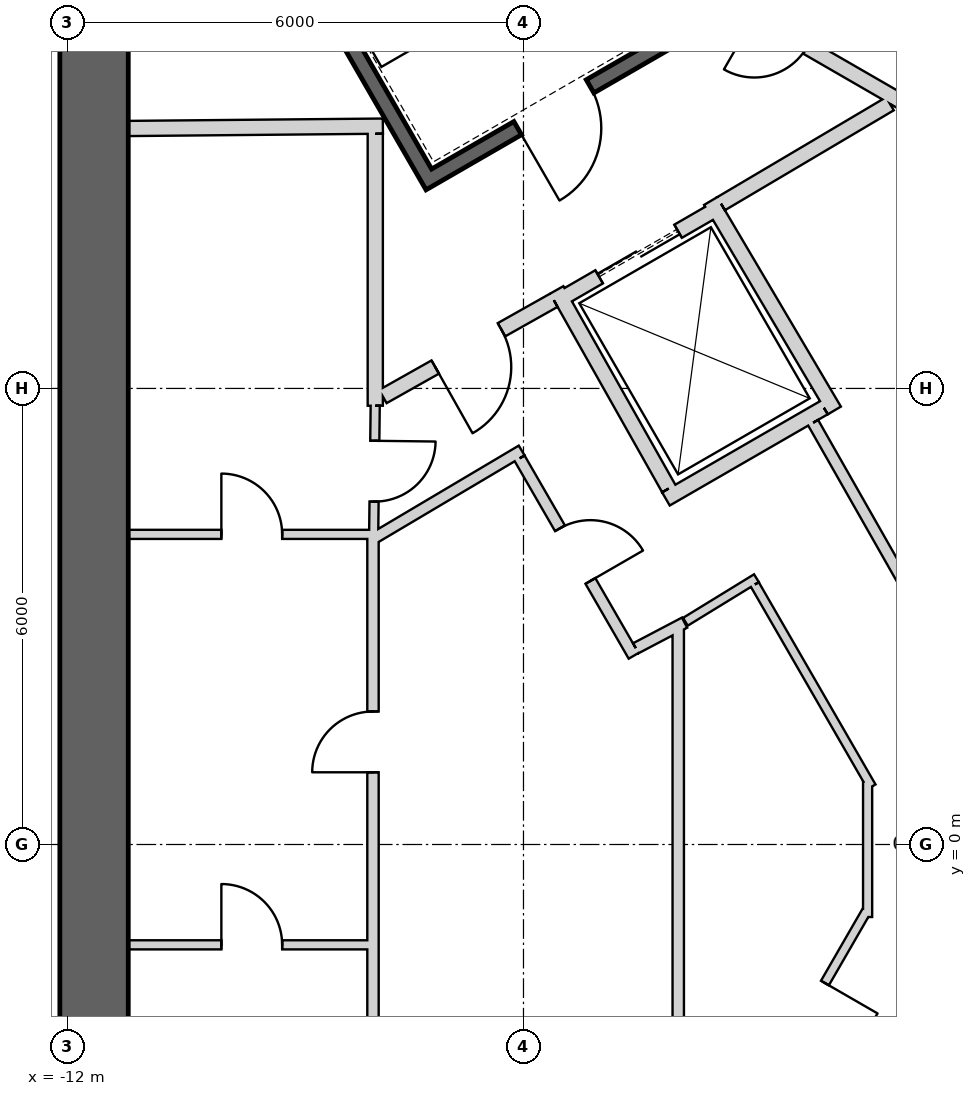
"""IFC4 building model, lengths in metres.
Left out: names, types, materials, properties, quantities, classifications, styles, units other than length and angle.
Written with IfcOpenShell. Run it as: python <this file> out.ifc"""

import sys

from ifc_helpers import new_model, si_unit, direction, frame, frame_2d, origin, place, context, subcontext, project, spatial, rectangle, extrude, element, fill, save


model = new_model("IFC4")
c1 = context("Model", 3, precision=1e-05, world=origin(), true_north=direction((0.0, 1.0)))
c2 = subcontext(c1, "Body", "Model", "MODEL_VIEW")
j1 = project(units=[si_unit("LENGTHUNIT", "METRE"), si_unit("PLANEANGLEUNIT", "RADIAN")], contexts=[c1])
p1 = place(None, origin())
s1 = spatial("IfcSite", under=j1, at=p1, CompositionType="ELEMENT")
p2 = place(p1, origin())
s2 = spatial("IfcBuilding", under=s1, at=p2, CompositionType="ELEMENT")
p3 = place(p2, frame((0.0, 0.0, 435.3)))
s3 = spatial("IfcBuildingStorey", under=s2, at=p3, CompositionType="ELEMENT", Elevation=435.3)
p4 = place(p3, frame((19.475, 2.208, 0.0), z_axis=(0.0, 0.0, 1.0), x_axis=(-0.866028369851, 0.499994862586, 0.0)))
e1 = element("IfcWall", 1, at=p4, inside=s3, PredefinedType="SHEAR", context=c2, shape_type="SweptSolid", body=[
    extrude(rectangle(XDim=31.523, YDim=0.9, at=frame_2d((15.762, 0.0))), origin(), (0.0, 0.0, 1.0), 5.0),
])
p5 = place(p4, frame((3.612, 0.0, 0.0)))
e2 = element("IfcOpeningElement", 2, at=p5, cuts=e1, PredefinedType="OPENING", context=c2, shape_type="SweptSolid", body=[
    extrude(rectangle(XDim=1.2, YDim=2.4, at=frame_2d((0.6, 1.2))), frame((0.0, 0.46, 0.0), z_axis=(0.0, -1.0, 0.0), x_axis=(1.0, 0.0, 0.0)), (0.0, 0.0, 1.0), 0.92),
])
p6 = place(p4, frame((26.712, 0.0, 0.0)))
e3 = element("IfcOpeningElement", 3, at=p6, cuts=e1, PredefinedType="OPENING", context=c2, shape_type="SweptSolid", body=[
    extrude(rectangle(XDim=1.2, YDim=2.4, at=frame_2d((0.6, 1.2))), frame((0.0, 0.46, 0.0), z_axis=(0.0, -1.0, 0.0), x_axis=(1.0, 0.0, 0.0)), (0.0, 0.0, 1.0), 0.92),
])
p7 = place(p3, frame((-11.65, 15.762, 0.0), z_axis=(0.0, 0.0, 1.0), x_axis=(0.0, -1.0, 0.0)))
e4 = element("IfcWall", 4, at=p7, inside=s3, PredefinedType="SHEAR", context=c2, shape_type="SweptSolid", body=[
    extrude(rectangle(XDim=31.523, YDim=0.9, at=frame_2d((15.762, 0.0))), origin(), (0.0, 0.0, 1.0), 5.0),
])
p8 = place(p7, frame((3.612, 0.0, 0.0)))
e5 = element("IfcOpeningElement", 5, at=p8, cuts=e4, PredefinedType="OPENING", context=c2, shape_type="SweptSolid", body=[
    extrude(rectangle(XDim=1.2, YDim=2.4, at=frame_2d((0.6, 1.2))), frame((0.0, 0.46, 0.0), z_axis=(0.0, -1.0, 0.0), x_axis=(1.0, 0.0, 0.0)), (0.0, 0.0, 1.0), 0.92),
])
p9 = place(p7, frame((26.712, 0.0, 0.0)))
e6 = element("IfcOpeningElement", 6, at=p9, cuts=e4, PredefinedType="OPENING", context=c2, shape_type="SweptSolid", body=[
    extrude(rectangle(XDim=1.2, YDim=2.4, at=frame_2d((0.6, 1.2))), frame((0.0, 0.46, 0.0), z_axis=(0.0, -1.0, 0.0), x_axis=(1.0, 0.0, 0.0)), (0.0, 0.0, 1.0), 0.92),
])
p10 = place(p3, frame((-7.825, -17.97, 0.0), z_axis=(0.0, 0.0, 1.0), x_axis=(0.866028369851, 0.499994862586, 0.0)))
e7 = element("IfcWall", 7, at=p10, inside=s3, PredefinedType="SHEAR", context=c2, shape_type="SweptSolid", body=[
    extrude(rectangle(XDim=31.523, YDim=0.9, at=frame_2d((15.762, 0.0))), origin(), (0.0, 0.0, 1.0), 5.0),
])
p11 = place(p10, frame((17.862, 0.0, 0.0)))
e8 = element("IfcOpeningElement", 8, at=p11, cuts=e7, PredefinedType="OPENING", context=c2, shape_type="SweptSolid", body=[
    extrude(rectangle(XDim=1.2, YDim=2.4, at=frame_2d((0.6, 1.2))), frame((0.0, 0.46, 0.0), z_axis=(0.0, -1.0, 0.0), x_axis=(1.0, 0.0, 0.0)), (0.0, 0.0, 1.0), 0.92),
])
p12 = place(p10, frame((20.562, 0.0, 0.0)))
e9 = element("IfcOpeningElement", 9, at=p12, cuts=e7, PredefinedType="OPENING", context=c2, shape_type="SweptSolid", body=[
    extrude(rectangle(XDim=1.2, YDim=2.4, at=frame_2d((0.6, 1.2))), frame((0.0, 0.46, 0.0), z_axis=(0.0, -1.0, 0.0), x_axis=(1.0, 0.0, 0.0)), (0.0, 0.0, 1.0), 0.92),
])
p13 = place(p10, frame((26.712, 0.0, 0.0)))
e10 = element("IfcOpeningElement", 10, at=p13, cuts=e7, PredefinedType="OPENING", context=c2, shape_type="SweptSolid", body=[
    extrude(rectangle(XDim=1.2, YDim=2.4, at=frame_2d((0.6, 1.2))), frame((0.0, 0.46, 0.0), z_axis=(0.0, -1.0, 0.0), x_axis=(1.0, 0.0, 0.0)), (0.0, 0.0, 1.0), 0.92),
])
p14 = place(p10, frame((3.612, 0.0, 0.0)))
e11 = element("IfcOpeningElement", 11, at=p14, cuts=e7, PredefinedType="OPENING", context=c2, shape_type="SweptSolid", body=[
    extrude(rectangle(XDim=1.2, YDim=2.4, at=frame_2d((0.6, 1.2))), frame((0.0, 0.46, 0.0), z_axis=(0.0, -1.0, 0.0), x_axis=(1.0, 0.0, 0.0)), (0.0, 0.0, 1.0), 0.92),
])
p15 = place(p3, frame((-11.245, 15.678, -0.25), z_axis=(0.0, 0.0, 1.0), x_axis=(0.499977274689, -0.866038523851, 0.0)))
e12 = element("IfcWall", 12, at=p15, inside=s3, PredefinedType="SHEAR", context=c2, shape_type="SweptSolid", body=[
    extrude(rectangle(XDim=8.1, YDim=0.2, at=frame_2d((4.05, 0.0))), origin(), (0.0, 0.0, 1.0), 5.0),
])
p16 = place(p3, frame((-7.159, 8.8, -0.25), z_axis=(0.0, 0.0, 1.0), x_axis=(0.866047807691, 0.499961193289, 0.0)))
e13 = element("IfcWall", 13, at=p16, inside=s3, PredefinedType="SHEAR", context=c2, shape_type="SweptSolid", body=[
    extrude(rectangle(XDim=3.6, YDim=0.2, at=frame_2d((1.8, 0.0))), origin(), (0.0, 0.0, 1.0), 5.0),
])
p17 = place(p16, frame((1.25, 0.0, 0.25)))
e14 = element("IfcOpeningElement", 14, at=p17, cuts=e13, PredefinedType="OPENING", context=c2, shape_type="SweptSolid", body=[
    extrude(rectangle(XDim=1.1, YDim=2.1, at=frame_2d((0.55, 1.05))), frame((0.0, 0.11, 0.0), z_axis=(0.0, -1.0, 0.0), x_axis=(1.0, 0.0, 0.0)), (0.0, 0.0, 1.0), 0.22),
])
p18 = place(p3, frame((-5.524, 7.168, 0.0), z_axis=(0.0, 0.0, 1.0), x_axis=(0.866024647952, 0.500001309137, 0.0)))
e15 = element("IfcWall", 15, at=p18, inside=s3, PredefinedType="PLUMBINGWALL", context=c2, shape_type="SweptSolid", body=[
    extrude(rectangle(XDim=2.4, YDim=0.2, at=frame_2d((1.2, 0.0))), origin(), (0.0, 0.0, 1.0), 4.75),
])
p19 = place(p18, frame((0.6, 0.0, 0.0)))
e16 = element("IfcOpeningElement", 16, at=p19, cuts=e15, PredefinedType="OPENING", context=c2, shape_type="SweptSolid", body=[
    extrude(rectangle(XDim=1.2, YDim=2.4, at=frame_2d((0.6, 1.2))), frame((0.0, 0.11, 0.0), z_axis=(0.0, -1.0, 0.0), x_axis=(1.0, 0.0, 0.0)), (0.0, 0.0, 1.0), 0.22),
])
p20 = place(p3, frame((-3.538, 8.465, 0.0), z_axis=(0.0, 0.0, 1.0), x_axis=(0.508616218331, -0.860993346345, 0.0)))
e17 = element("IfcWall", 17, at=p20, inside=s3, PredefinedType="PLUMBINGWALL", context=c2, shape_type="SweptSolid", body=[
    extrude(rectangle(XDim=3.2, YDim=0.2, at=frame_2d((1.6, 0.0))), origin(), (0.0, 0.0, 1.0), 4.75),
])
p21 = place(p3, frame((-2.047, 5.746, 0.0), z_axis=(0.0, 0.0, 1.0), x_axis=(-0.866024647952, -0.500001309137, 0.0)))
e18 = element("IfcWall", 18, at=p21, inside=s3, PredefinedType="PLUMBINGWALL", context=c2, shape_type="SweptSolid", body=[
    extrude(rectangle(XDim=2.4, YDim=0.2, at=frame_2d((1.2, 0.0))), origin(), (0.0, 0.0, 1.0), 4.75),
])
p22 = place(p3, frame((-5.562, 7.296, 0.0), z_axis=(0.0, 0.0, 1.0), x_axis=(0.49134651263, -0.870964180966, 0.0)))
e19 = element("IfcWall", 19, at=p22, inside=s3, PredefinedType="PLUMBINGWALL", context=c2, shape_type="SweptSolid", body=[
    extrude(rectangle(XDim=3.0, YDim=0.2, at=frame_2d((1.5, 0.0))), origin(), (0.0, 0.0, 1.0), 4.75),
])
p23 = place(p3, frame((-11.2, 4.08, 0.0), z_axis=(0.0, 0.0, 1.0), x_axis=(1.0, 0.0, 0.0)))
e20 = element("IfcWall", 20, at=p23, inside=s3, PredefinedType="PARTITIONING", context=c2, shape_type="SweptSolid", body=[
    extrude(rectangle(XDim=3.25, YDim=0.12, at=frame_2d((1.625, 0.0))), origin(), (0.0, 0.0, 1.0), 4.75),
])
p24 = place(p23, frame((1.225, 0.0, 0.0)))
e21 = element("IfcOpeningElement", 21, at=p24, cuts=e20, PredefinedType="OPENING", context=c2, shape_type="SweptSolid", body=[
    extrude(rectangle(XDim=0.8, YDim=2.1, at=frame_2d((0.4, 1.05))), frame((0.0, 0.07, 0.0), z_axis=(0.0, -1.0, 0.0), x_axis=(1.0, 0.0, 0.0)), (0.0, 0.0, 1.0), 0.14),
])
p25 = place(p3, frame((-7.85, 9.451, 0.0), z_axis=(0.0, 0.0, 1.0), x_axis=(-0.999957167047, -0.009255488683, 0.0)))
e22 = element("IfcWall", 22, at=p25, inside=s3, PredefinedType="PARTITIONING", context=c2, shape_type="SweptSolid", body=[
    extrude(rectangle(XDim=3.35, YDim=0.2, at=frame_2d((1.675, 0.0))), origin(), (0.0, 0.0, 1.0), 4.75),
])
p26 = place(p3, frame((-7.95, 5.772, 0.0), z_axis=(0.0, 0.0, 1.0), x_axis=(0.0, 1.0, 0.0)))
e23 = element("IfcWall", 23, at=p26, inside=s3, PredefinedType="PARTITIONING", context=c2, shape_type="SweptSolid", body=[
    extrude(rectangle(XDim=3.578, YDim=0.2, at=frame_2d((1.789, 0.0))), origin(), (0.0, 0.0, 1.0), 4.75),
])
p27 = place(p3, frame((-7.971, 4.05, 0.0), z_axis=(0.0, 0.0, 1.0), x_axis=(0.012047318415, 0.999927428426, 0.0)))
e24 = element("IfcWall", 24, at=p27, inside=s3, PredefinedType="PARTITIONING", context=c2, shape_type="SweptSolid", body=[
    extrude(rectangle(XDim=1.723, YDim=0.12, at=frame_2d((0.861, 0.0))), origin(), (0.0, 0.0, 1.0), 4.75),
])
p28 = place(p27, frame((0.461, 0.0, 0.0)))
e25 = element("IfcOpeningElement", 25, at=p28, cuts=e24, PredefinedType="OPENING", context=c2, shape_type="SweptSolid", body=[
    extrude(rectangle(XDim=0.8, YDim=2.1, at=frame_2d((0.4, 1.05))), frame((0.0, 0.07, 0.0), z_axis=(0.0, -1.0, 0.0), x_axis=(1.0, 0.0, 0.0)), (0.0, 0.0, 1.0), 0.14),
])
p29 = place(p3, frame((-11.2, -1.32, 0.0), z_axis=(0.0, 0.0, 1.0), x_axis=(1.0, 0.0, 0.0)))
e26 = element("IfcWall", 26, at=p29, inside=s3, PredefinedType="PARTITIONING", context=c2, shape_type="SweptSolid", body=[
    extrude(rectangle(XDim=3.25, YDim=0.12, at=frame_2d((1.625, 0.0))), origin(), (0.0, 0.0, 1.0), 4.75),
])
p30 = place(p29, frame((1.225, 0.0, 0.0)))
e27 = element("IfcOpeningElement", 27, at=p30, cuts=e26, PredefinedType="OPENING", context=c2, shape_type="SweptSolid", body=[
    extrude(rectangle(XDim=0.8, YDim=2.1, at=frame_2d((0.4, 1.05))), frame((0.0, 0.07, 0.0), z_axis=(0.0, -1.0, 0.0), x_axis=(1.0, 0.0, 0.0)), (0.0, 0.0, 1.0), 0.14),
])
p31 = place(p3, frame((-7.98, 4.05, 0.0), z_axis=(0.0, 0.0, 1.0), x_axis=(0.0, -1.0, 0.0)))
e28 = element("IfcWall", 28, at=p31, inside=s3, PredefinedType="PLUMBINGWALL", context=c2, shape_type="SweptSolid", body=[
    extrude(rectangle(XDim=8.1, YDim=0.15, at=frame_2d((4.05, 0.0))), origin(), (0.0, 0.0, 1.0), 4.75),
])
p32 = place(p31, frame((2.3, 0.0, 0.0)))
e29 = element("IfcOpeningElement", 29, at=p32, cuts=e28, PredefinedType="OPENING", context=c2, shape_type="SweptSolid", body=[
    extrude(rectangle(XDim=0.8, YDim=2.1, at=frame_2d((0.4, 1.05))), frame((0.0, 0.085, 0.0), z_axis=(0.0, -1.0, 0.0), x_axis=(1.0, 0.0, 0.0)), (0.0, 0.0, 1.0), 0.17),
])
p33 = place(p3, frame((-4.296, 11.66, 0.0), z_axis=(0.0, 0.0, 1.0), x_axis=(0.866027389382, -0.499996560828, 0.0)))
e30 = element("IfcWall", 30, at=p33, inside=s3, PredefinedType="PARTITIONING", context=c2, shape_type="SweptSolid", body=[
    extrude(rectangle(XDim=3.778, YDim=0.2, at=frame_2d((1.889, 0.0))), origin(), (0.0, 0.0, 1.0), 4.75),
])
p34 = place(p33, frame((1.539, 0.0, 0.0)))
e31 = element("IfcOpeningElement", 31, at=p34, cuts=e30, PredefinedType="OPENING", context=c2, shape_type="SweptSolid", body=[
    extrude(rectangle(XDim=0.8, YDim=2.1, at=frame_2d((0.4, 1.05))), frame((0.0, 0.11, 0.0), z_axis=(0.0, -1.0, 0.0), x_axis=(1.0, 0.0, 0.0)), (0.0, 0.0, 1.0), 0.22),
])
p35 = place(p3, frame((-1.179, 9.745, 0.0), z_axis=(0.0, 0.0, 1.0), x_axis=(-0.860630814782, -0.509229418482, 0.0)))
e32 = element("IfcWall", 32, at=p35, inside=s3, PredefinedType="PARTITIONING", context=c2, shape_type="SweptSolid", body=[
    extrude(rectangle(XDim=2.582, YDim=0.2, at=frame_2d((1.291, 0.0))), origin(), (0.0, 0.0, 1.0), 4.75),
])
p36 = place(p3, frame((-5.6, 7.16, 0.0), z_axis=(0.0, 0.0, 1.0), x_axis=(-0.871350695252, -0.490660744185, 0.0)))
e33 = element("IfcWall", 33, at=p36, inside=s3, PredefinedType="PARTITIONING", context=c2, shape_type="SweptSolid", body=[
    extrude(rectangle(XDim=2.582, YDim=0.2, at=frame_2d((1.291, 0.0))), origin(), (0.0, 0.0, 1.0), 4.75),
])
p37 = place(p36, frame((0.791, 0.0, 0.0)))
e34 = element("IfcOpeningElement", 34, at=p37, cuts=e33, PredefinedType="OPENING", context=c2, shape_type="SweptSolid", body=[
    extrude(rectangle(XDim=1.0, YDim=2.1, at=frame_2d((0.5, 1.05))), frame((0.0, 0.11, 0.0), z_axis=(0.0, -1.0, 0.0), x_axis=(1.0, 0.0, 0.0)), (0.0, 0.0, 1.0), 0.22),
])
p38 = place(p3, frame((-2.189, 5.549, 0.0), z_axis=(0.0, 0.0, 1.0), x_axis=(0.494335077001, -0.869271437266, 0.0)))
e35 = element("IfcWall", 35, at=p38, inside=s3, PredefinedType="PLUMBINGWALL", context=c2, shape_type="SweptSolid", body=[
    extrude(rectangle(XDim=4.404, YDim=0.15, at=frame_2d((2.202, 0.0))), origin(), (0.0, 0.0, 1.0), 4.75),
])
p39 = place(p3, frame((0.051, -1.611, 0.0), z_axis=(0.0, 0.0, 1.0), x_axis=(-0.49434454467, -0.869266053148, 0.0)))
e36 = element("IfcWall", 36, at=p39, inside=s3, PredefinedType="PARTITIONING", context=c2, shape_type="SweptSolid", body=[
    extrude(rectangle(XDim=4.53, YDim=0.12, at=frame_2d((2.265, 0.0))), origin(), (0.0, 0.0, 1.0), 4.75),
])
p40 = place(p39, frame((1.916, 0.0, 0.0)))
e37 = element("IfcOpeningElement", 37, at=p40, cuts=e36, PredefinedType="OPENING", context=c2, shape_type="SweptSolid", body=[
    extrude(rectangle(XDim=0.8, YDim=2.1, at=frame_2d((0.4, 1.05))), frame((0.0, 0.07, 0.0), z_axis=(0.0, -1.0, 0.0), x_axis=(1.0, 0.0, 0.0)), (0.0, 0.0, 1.0), 0.14),
])
p41 = place(p3, frame((-3.964, -2.908, 0.0), z_axis=(0.0, 0.0, 1.0), x_axis=(0.0, 1.0, 0.0)))
e38 = element("IfcWall", 38, at=p41, inside=s3, PredefinedType="PLUMBINGWALL", context=c2, shape_type="SweptSolid", body=[
    extrude(rectangle(XDim=5.815, YDim=0.15, at=frame_2d((2.908, 0.0))), origin(), (0.0, 0.0, 1.0), 4.75),
])
p42 = place(p3, frame((-6.024, 5.183, 0.0), z_axis=(0.0, 0.0, 1.0), x_axis=(-0.860126804455, -0.510080268447, 0.0)))
e39 = element("IfcWall", 39, at=p42, inside=s3, PredefinedType="PLUMBINGWALL", context=c2, shape_type="SweptSolid", body=[
    extrude(rectangle(XDim=2.24, YDim=0.15, at=frame_2d((1.12, 0.0))), origin(), (0.0, 0.0, 1.0), 4.75),
])
p43 = place(p3, frame((-4.551, 2.482, 0.0), z_axis=(0.0, 0.0, 1.0), x_axis=(-0.499990139034, 0.866031096941, 0.0)))
e40 = element("IfcWall", 40, at=p43, inside=s3, PredefinedType="PLUMBINGWALL", context=c2, shape_type="SweptSolid", body=[
    extrude(rectangle(XDim=3.0, YDim=0.15, at=frame_2d((1.5, 0.0))), origin(), (0.0, 0.0, 1.0), 4.75),
])
p44 = place(p43, frame((1.137, 0.0, 0.0)))
e41 = element("IfcOpeningElement", 41, at=p44, cuts=e40, PredefinedType="OPENING", context=c2, shape_type="SweptSolid", body=[
    extrude(rectangle(XDim=0.8, YDim=2.1, at=frame_2d((0.4, 1.05))), frame((0.0, 0.085, 0.0), z_axis=(0.0, -1.0, 0.0), x_axis=(1.0, 0.0, 0.0)), (0.0, 0.0, 1.0), 0.17),
])
p45 = place(p3, frame((-3.881, 2.919, 0.0), z_axis=(0.0, 0.0, 1.0), x_axis=(-0.885422176933, -0.464787659684, 0.0)))
e42 = element("IfcWall", 42, at=p45, inside=s3, PredefinedType="PLUMBINGWALL", context=c2, shape_type="SweptSolid", body=[
    extrude(rectangle(XDim=0.724, YDim=0.15, at=frame_2d((0.362, 0.0))), origin(), (0.0, 0.0, 1.0), 4.75),
])
p46 = place(p3, frame((-2.935, 3.503, 0.0), z_axis=(0.0, 0.0, 1.0), x_axis=(-0.852482838041, -0.522755211209, 0.0)))
e43 = element("IfcWall", 43, at=p46, inside=s3, PredefinedType="PARTITIONING", context=c2, shape_type="SweptSolid", body=[
    extrude(rectangle(XDim=1.097, YDim=0.12, at=frame_2d((0.548, 0.0))), origin(), (0.0, 0.0, 1.0), 4.75),
])
p47 = place(p3, frame((-1.42, 0.76, 0.0), z_axis=(0.0, 0.0, 1.0), x_axis=(-0.500011413361, 0.866018814177, 0.0)))
e44 = element("IfcWall", 44, at=p47, inside=s3, PredefinedType="PARTITIONING", context=c2, shape_type="SweptSolid", body=[
    extrude(rectangle(XDim=3.072, YDim=0.12, at=frame_2d((1.536, 0.0))), origin(), (0.0, 0.0, 1.0), 4.75),
])
p48 = place(p3, frame((-1.472, -0.954, 0.0), z_axis=(0.0, 0.0, 1.0), x_axis=(0.0, 1.0, 0.0)))
e45 = element("IfcWall", 45, at=p48, inside=s3, PredefinedType="PARTITIONING", context=c2, shape_type="SweptSolid", body=[
    extrude(rectangle(XDim=1.785, YDim=0.12, at=frame_2d((0.893, 0.0))), origin(), (0.0, 0.0, 1.0), 4.75),
])
p49 = place(p3, frame((-3.016, -3.524, 0.0), z_axis=(0.0, 0.0, 1.0), x_axis=(0.499988681553, 0.866031938394, 0.0)))
e46 = element("IfcWall", 46, at=p49, inside=s3, PredefinedType="PARTITIONING", context=c2, shape_type="SweptSolid", body=[
    extrude(rectangle(XDim=3.069, YDim=0.12, at=frame_2d((1.535, 0.0))), origin(), (0.0, 0.0, 1.0), 4.75),
])
p50 = place(p49, frame((1.165, 0.0, 0.0)))
e47 = element("IfcOpeningElement", 47, at=p50, cuts=e46, PredefinedType="OPENING", context=c2, shape_type="SweptSolid", body=[
    extrude(rectangle(XDim=0.8, YDim=2.1, at=frame_2d((0.4, 1.05))), frame((0.0, 0.07, 0.0), z_axis=(0.0, -1.0, 0.0), x_axis=(1.0, 0.0, 0.0)), (0.0, 0.0, 1.0), 0.14),
])
p51 = place(p3, frame((20.834, 3.675, 0.0), z_axis=(0.0, 0.0, 1.0), x_axis=(-0.866028536494, 0.499994573949, 0.0)))
e48 = element("IfcWall", 48, at=p51, inside=s3, PredefinedType="PARTITIONING", context=c2, shape_type="SweptSolid", body=[
    extrude(rectangle(XDim=32.411, YDim=0.2, at=frame_2d((16.206, 0.0))), origin(), (0.0, 0.0, 1.0), 4.75),
])
p52 = place(p51, frame((7.7, 0.0, 0.0)))
e49 = element("IfcOpeningElement", 49, at=p52, cuts=e48, PredefinedType="OPENING", context=c2, shape_type="SweptSolid", body=[
    extrude(rectangle(XDim=1.0, YDim=2.1, at=frame_2d((0.5, 1.05))), frame((0.0, 0.11, 0.0), z_axis=(0.0, -1.0, 0.0), x_axis=(1.0, 0.0, 0.0)), (0.0, 0.0, 1.0), 0.22),
])
p53 = place(p51, frame((18.006, 0.0, 0.0)))
e50 = element("IfcOpeningElement", 50, at=p53, cuts=e48, PredefinedType="OPENING", context=c2, shape_type="SweptSolid", body=[
    extrude(rectangle(XDim=1.0, YDim=2.1, at=frame_2d((0.5, 1.05))), frame((0.0, 0.11, 0.0), z_axis=(0.0, -1.0, 0.0), x_axis=(1.0, 0.0, 0.0)), (0.0, 0.0, 1.0), 0.22),
])
p54 = place(p17, origin())
e51 = element("IfcDoor", 51, at=p54, inside=s3, OperationType="SINGLE_SWING_LEFT", PredefinedType="USERDEFINED", context=c2, shape_type="SweptSolid", body=[
    extrude(rectangle(XDim=1.1, YDim=2.1, at=frame_2d((0.55, 1.05))), frame((0.0, 0.025, 0.0), z_axis=(0.0, -1.0, 0.0), x_axis=(1.0, 0.0, 0.0)), (0.0, 0.0, 1.0), 0.05),
])
fill(e14, e51)
p55 = place(p37, origin())
e52 = element("IfcDoor", 52, at=p55, inside=s3, OperationType="SINGLE_SWING_RIGHT", PredefinedType="USERDEFINED", context=c2, shape_type="SweptSolid", body=[
    extrude(rectangle(XDim=1.0, YDim=2.1, at=frame_2d((0.5, 1.05))), frame((0.0, 0.025, 0.0), z_axis=(0.0, -1.0, 0.0), x_axis=(1.0, 0.0, 0.0)), (0.0, 0.0, 1.0), 0.05),
])
fill(e34, e52)
p56 = place(p19, origin())
e53 = element("IfcDoor", 53, at=p56, inside=s3, OperationType="SLIDING_TO_LEFT", PredefinedType="USERDEFINED", context=c2, shape_type="SweptSolid", body=[
    extrude(rectangle(XDim=1.2, YDim=2.4, at=frame_2d((0.6, 1.2))), frame((0.0, 0.025, 0.0), z_axis=(0.0, -1.0, 0.0), x_axis=(1.0, 0.0, 0.0)), (0.0, 0.0, 1.0), 0.05),
])
fill(e16, e53)
p57 = place(p44, origin())
e54 = element("IfcDoor", 54, at=p57, inside=s3, OperationType="SINGLE_SWING_LEFT", PredefinedType="USERDEFINED", context=c2, shape_type="SweptSolid", body=[
    extrude(rectangle(XDim=0.8, YDim=2.1, at=frame_2d((0.4, 1.05))), frame((0.0, 0.025, 0.0), z_axis=(0.0, -1.0, 0.0), x_axis=(1.0, 0.0, 0.0)), (0.0, 0.0, 1.0), 0.05),
])
fill(e41, e54)
p58 = place(p50, origin())
e55 = element("IfcDoor", 55, at=p58, inside=s3, OperationType="SINGLE_SWING_RIGHT", PredefinedType="USERDEFINED", context=c2, shape_type="SweptSolid", body=[
    extrude(rectangle(XDim=0.8, YDim=2.1, at=frame_2d((0.4, 1.05))), frame((0.0, 0.025, 0.0), z_axis=(0.0, -1.0, 0.0), x_axis=(1.0, 0.0, 0.0)), (0.0, 0.0, 1.0), 0.05),
])
fill(e47, e55)
p59 = place(p28, origin())
e56 = element("IfcDoor", 56, at=p59, inside=s3, OperationType="SINGLE_SWING_RIGHT", PredefinedType="USERDEFINED", context=c2, shape_type="SweptSolid", body=[
    extrude(rectangle(XDim=0.8, YDim=2.1, at=frame_2d((0.4, 1.05))), frame((0.0, 0.025, 0.0), z_axis=(0.0, -1.0, 0.0), x_axis=(1.0, 0.0, 0.0)), (0.0, 0.0, 1.0), 0.05),
])
fill(e25, e56)
p60 = place(p30, origin())
e57 = element("IfcDoor", 57, at=p60, inside=s3, OperationType="SINGLE_SWING_LEFT", PredefinedType="USERDEFINED", context=c2, shape_type="SweptSolid", body=[
    extrude(rectangle(XDim=0.8, YDim=2.1, at=frame_2d((0.4, 1.05))), frame((0.0, 0.025, 0.0), z_axis=(0.0, -1.0, 0.0), x_axis=(1.0, 0.0, 0.0)), (0.0, 0.0, 1.0), 0.05),
])
fill(e27, e57)
p61 = place(p32, origin())
e58 = element("IfcDoor", 58, at=p61, inside=s3, OperationType="SINGLE_SWING_RIGHT", PredefinedType="USERDEFINED", context=c2, shape_type="SweptSolid", body=[
    extrude(rectangle(XDim=0.8, YDim=2.1, at=frame_2d((0.4, 1.05))), frame((0.0, 0.025, 0.0), z_axis=(0.0, -1.0, 0.0), x_axis=(1.0, 0.0, 0.0)), (0.0, 0.0, 1.0), 0.05),
])
fill(e29, e58)
p62 = place(p24, origin())
e59 = element("IfcDoor", 59, at=p62, inside=s3, OperationType="SINGLE_SWING_LEFT", PredefinedType="USERDEFINED", context=c2, shape_type="SweptSolid", body=[
    extrude(rectangle(XDim=0.8, YDim=2.1, at=frame_2d((0.4, 1.05))), frame((0.0, 0.025, 0.0), z_axis=(0.0, -1.0, 0.0), x_axis=(1.0, 0.0, 0.0)), (0.0, 0.0, 1.0), 0.05),
])
fill(e21, e59)
save(model, sys.argv[1])
